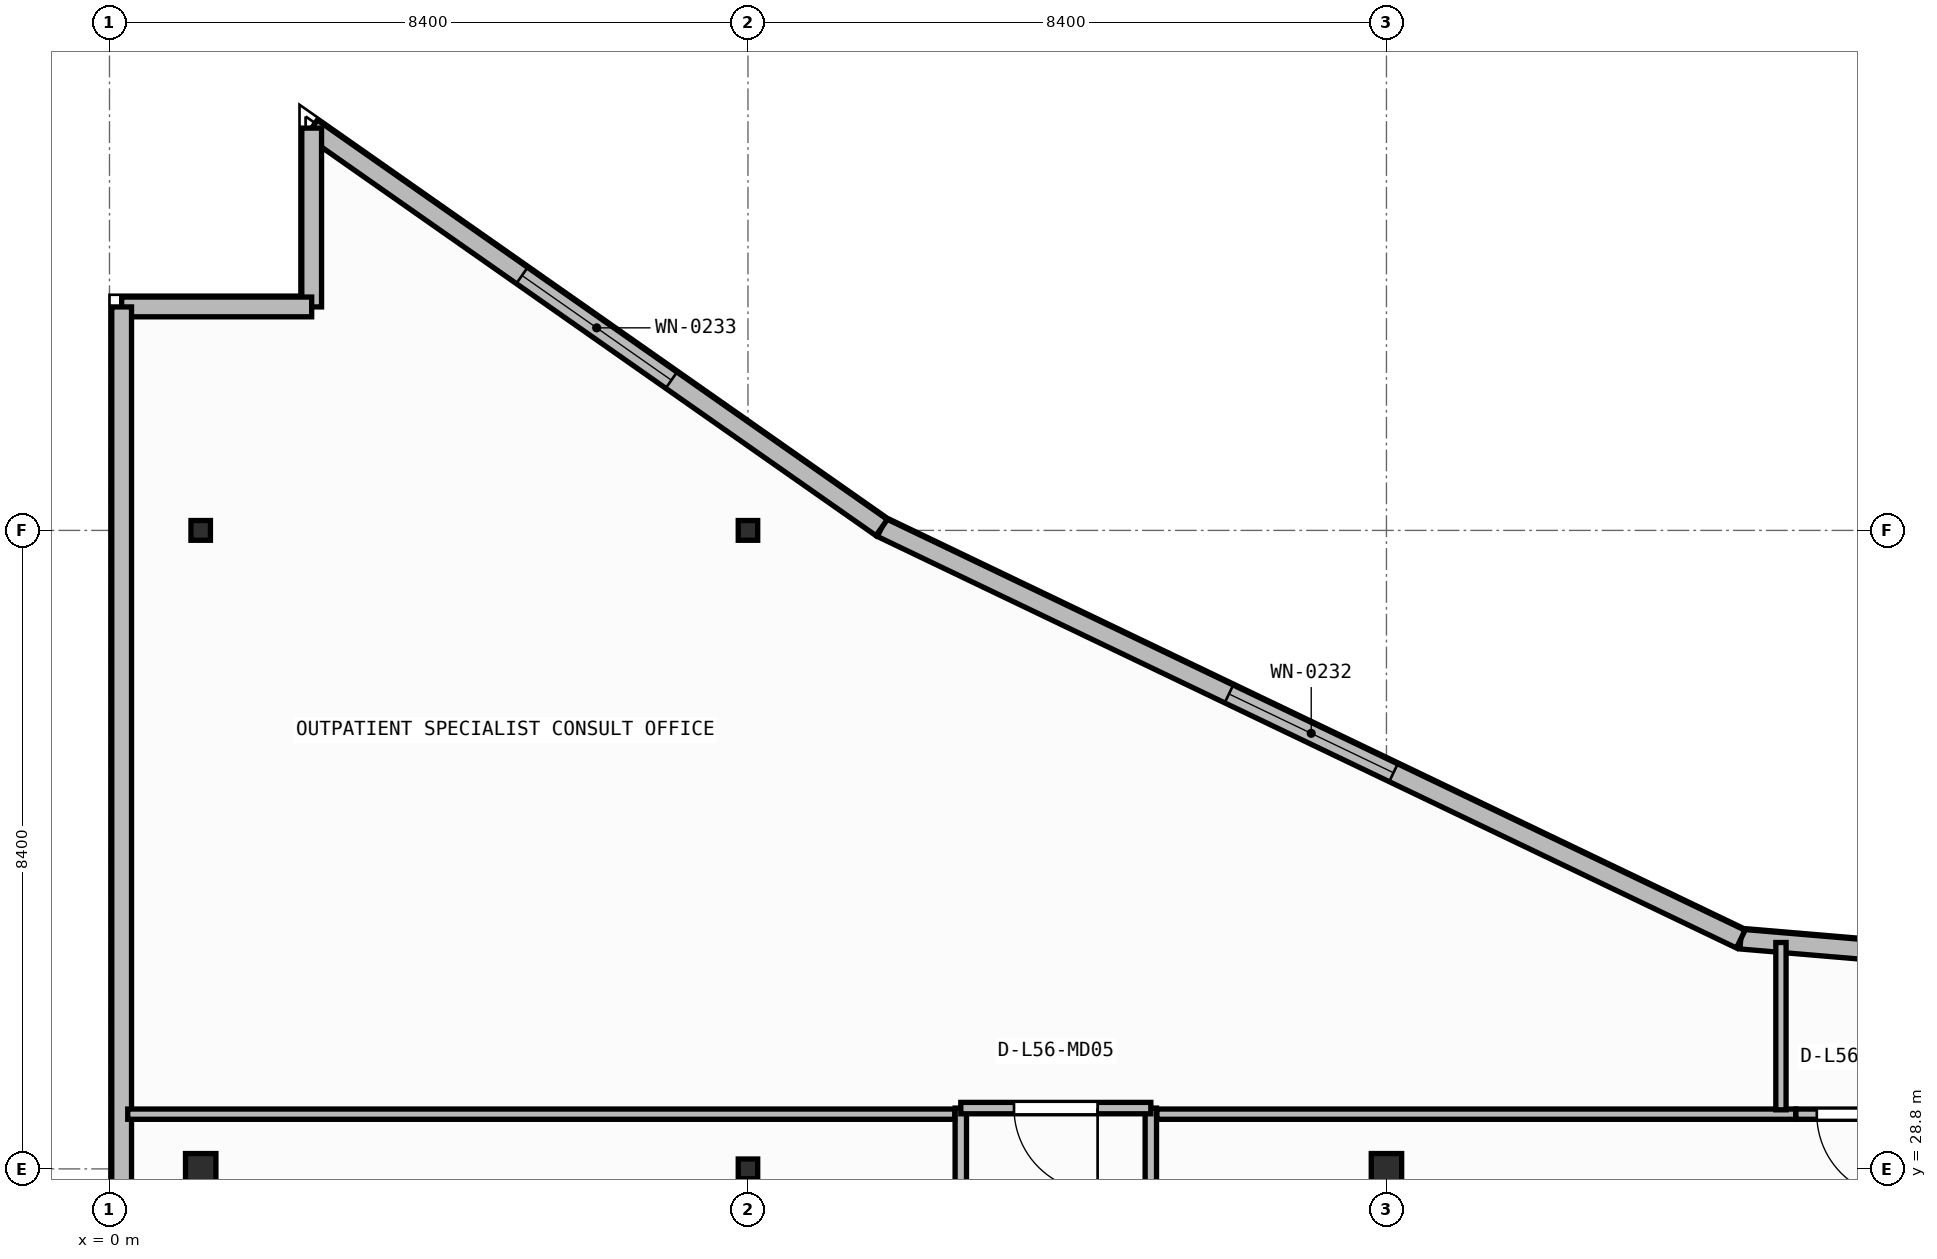
"""IFC4 building model, lengths in metres.
Left out: names, types, materials, properties, quantities, classifications, styles, units other than length and angle.
Written with IfcOpenShell. Run it as: python <this file> out.ifc"""

import sys

from ifc_helpers import new_model, si_unit, direction, frame, frame_2d, origin, origin_2d, place, context, subcontext, project, spatial, rectangle, i_section, extrude, element, fill, save


model = new_model("IFC4")
c1 = context("Model", 3, precision=1e-05, world=origin(), true_north=direction((0.0, 1.0)))
c2 = subcontext(c1, "Body", "Model", "MODEL_VIEW")
j1 = project(units=[si_unit("LENGTHUNIT", "METRE"), si_unit("PLANEANGLEUNIT", "RADIAN")], contexts=[c1])
p1 = place(None, origin())
s1 = spatial("IfcSite", under=j1, at=p1, CompositionType="ELEMENT")
p2 = place(p1, origin())
s2 = spatial("IfcBuilding", under=s1, at=p2, CompositionType="ELEMENT")
p3 = place(p2, frame((0.0, 0.0, 227.65)))
s3 = spatial("IfcBuildingStorey", under=s2, at=p3, CompositionType="ELEMENT", Elevation=227.65)
p4 = place(p3, frame((1.2, 28.8, 0.0), z_axis=(0.0, 0.0, 1.0), x_axis=(1.0, 0.0, 0.0)))
e1 = element("IfcColumn", 1, at=p4, inside=s3, PredefinedType="COLUMN", context=c2, shape_type="SweptSolid", body=[
    extrude(i_section(OverallWidth=0.4, OverallDepth=0.404, WebThickness=0.02, FlangeThickness=0.032, at=origin_2d()), origin(), (0.0, 0.0, 1.0), 3.95),
])
p5 = place(p3, frame((8.4, 28.8, 0.0), z_axis=(0.0, 0.0, 1.0), x_axis=(1.0, 0.0, 0.0)))
e2 = element("IfcColumn", 2, at=p5, inside=s3, PredefinedType="COLUMN", context=c2, shape_type="SweptSolid", body=[
    extrude(i_section(OverallWidth=0.256, OverallDepth=0.26, WebThickness=0.01, FlangeThickness=0.017, FilletRadius=0.013, at=origin_2d()), origin(), (0.0, 0.0, 1.0), 3.95),
])
p6 = place(p3, frame((16.8, 28.8, 0.0), z_axis=(0.0, 0.0, 1.0), x_axis=(1.0, 0.0, 0.0)))
e3 = element("IfcColumn", 3, at=p6, inside=s3, PredefinedType="COLUMN", context=c2, shape_type="SweptSolid", body=[
    extrude(i_section(OverallWidth=0.4, OverallDepth=0.404, WebThickness=0.02, FlangeThickness=0.032, at=origin_2d()), origin(), (0.0, 0.0, 1.0), 3.95),
])
for number, where, z_axis, x_axis in (
    (4, (1.2, 37.2, 0.0), (0.0, 0.0, 1.0), (1.0, 0.0, 0.0)),
    (5, (8.4, 37.2, 0.0), (0.0, 0.0, 1.0), (1.0, 0.0, 0.0)),
):
    element("IfcColumn", number, at=place(p3, frame(where, z_axis=z_axis, x_axis=x_axis)), inside=s3, PredefinedType="COLUMN", context=c2, shape_type="SweptSolid", body=[
        extrude(i_section(OverallWidth=0.256, OverallDepth=0.26, WebThickness=0.01, FlangeThickness=0.017, FilletRadius=0.013, at=origin_2d()), origin(), (0.0, 0.0, 1.0), 3.95),
    ])
p7 = place(p3, frame((34.815, 30.696, 0.0), z_axis=(0.0, 0.0, 1.0), x_axis=(-0.996454704935, 0.084130975344, 0.0)))
e6 = element("IfcWall", 6, at=p7, inside=s3, PredefinedType="STANDARD", context=c2, shape_type="SweptSolid", body=[
    extrude(rectangle(XDim=13.401, YDim=0.26, at=frame_2d((6.701, 0.0))), origin(), (0.0, 0.0, 1.0), 3.71),
])
p8 = place(p7, frame((5.5, 0.0, 0.9)))
e7 = element("IfcOpeningElement", 7, at=p8, cuts=e6, PredefinedType="OPENING", context=c2, shape_type="SweptSolid", body=[
    extrude(rectangle(XDim=2.4, YDim=1.65, at=frame_2d((1.2, 0.825))), frame((0.0, 0.14, 0.0), z_axis=(0.0, -1.0, 0.0), x_axis=(1.0, 0.0, 0.0)), (0.0, 0.0, 1.0), 0.28),
])
p9 = place(p3, frame((21.461, 31.823, 0.0), z_axis=(0.0, 0.0, 1.0), x_axis=(-0.901858094827, 0.432032379336, 0.0)))
e8 = element("IfcWall", 8, at=p9, inside=s3, PredefinedType="STANDARD", context=c2, shape_type="SweptSolid", body=[
    extrude(rectangle(XDim=12.532, YDim=0.26, at=frame_2d((6.266, 0.0))), origin(), (0.0, 0.0, 1.0), 3.71),
])
p10 = place(p9, frame((5.066, 0.0, 0.9)))
e9 = element("IfcOpeningElement", 9, at=p10, cuts=e8, PredefinedType="OPENING", context=c2, shape_type="SweptSolid", body=[
    extrude(rectangle(XDim=2.4, YDim=1.65, at=frame_2d((1.2, 0.825))), frame((0.0, 0.14, 0.0), z_axis=(0.0, -1.0, 0.0), x_axis=(1.0, 0.0, 0.0)), (0.0, 0.0, 1.0), 0.28),
])
p11 = place(p3, frame((10.159, 37.237, 0.0), z_axis=(0.0, 0.0, 1.0), x_axis=(-0.818933702389, 0.57388813465, 0.0)))
e10 = element("IfcWall", 10, at=p11, inside=s3, PredefinedType="STANDARD", context=c2, shape_type="SweptSolid", body=[
    extrude(rectangle(XDim=9.157, YDim=0.26, at=frame_2d((4.579, 0.0))), origin(), (0.0, 0.0, 1.0), 3.71),
])
p12 = place(p11, frame((3.378, 0.0, 0.9)))
e11 = element("IfcOpeningElement", 11, at=p12, cuts=e10, PredefinedType="OPENING", context=c2, shape_type="SweptSolid", body=[
    extrude(rectangle(XDim=2.4, YDim=1.65, at=frame_2d((1.2, 0.825))), frame((0.0, 0.14, 0.0), z_axis=(0.0, -1.0, 0.0), x_axis=(1.0, 0.0, 0.0)), (0.0, 0.0, 1.0), 0.28),
])
p13 = place(p3, frame((2.66, 42.492, 0.0), z_axis=(0.0, 0.0, 1.0), x_axis=(0.0, -1.0, 0.0)))
e12 = element("IfcWall", 12, at=p13, inside=s3, PredefinedType="STANDARD", context=c2, shape_type="SweptSolid", body=[
    extrude(rectangle(XDim=2.353, YDim=0.26, at=frame_2d((1.176, 0.0))), origin(), (0.0, 0.0, 1.0), 3.71),
])
p14 = place(p3, frame((2.66, 40.14, 0.0), z_axis=(0.0, 0.0, 1.0), x_axis=(-1.0, 0.0, 0.0)))
e13 = element("IfcWall", 13, at=p14, inside=s3, PredefinedType="STANDARD", context=c2, shape_type="SweptSolid", body=[
    extrude(rectangle(XDim=2.5, YDim=0.26, at=frame_2d((1.25, 0.0))), origin(), (0.0, 0.0, 1.0), 3.71),
])
p15 = place(p3, frame((0.16, 40.14, 0.0), z_axis=(0.0, 0.0, 1.0), x_axis=(0.0, -1.0, 0.0)))
e14 = element("IfcWall", 14, at=p15, inside=s3, PredefinedType="STANDARD", context=c2, shape_type="SweptSolid", body=[
    extrude(rectangle(XDim=37.48, YDim=0.26, at=frame_2d((18.74, 0.0))), origin(), (0.0, 0.0, 1.0), 3.71),
])
p16 = place(p15, frame((13.926, 0.0, 0.0)))
e15 = element("IfcOpeningElement", 15, at=p16, cuts=e14, PredefinedType="OPENING", context=c2, shape_type="SweptSolid", body=[
    extrude(rectangle(XDim=1.3, YDim=2.15, at=frame_2d((0.65, 1.075))), frame((0.0, 0.14, 0.0), z_axis=(0.0, -1.0, 0.0), x_axis=(1.0, 0.0, 0.0)), (0.0, 0.0, 1.0), 0.28),
])
p17 = place(p3, frame((11.2, 29.6, 0.0), z_axis=(0.0, 0.0, 1.0), x_axis=(0.0, -1.0, 0.0)))
e16 = element("IfcWall", 16, at=p17, inside=s3, PredefinedType="PARTITIONING", context=c2, shape_type="SweptSolid", body=[
    extrude(rectangle(XDim=7.232, YDim=0.15, at=frame_2d((3.616, 0.0))), origin(), (0.0, 0.0, 1.0), 3.71),
])
p18 = place(p17, frame((3.066, 0.0, 0.0)))
e17 = element("IfcOpeningElement", 17, at=p18, cuts=e16, PredefinedType="OPENING", context=c2, shape_type="SweptSolid", body=[
    extrude(rectangle(XDim=1.1, YDim=2.1, at=frame_2d((0.55, 1.05))), frame((0.0, 0.085, 0.0), z_axis=(0.0, -1.0, 0.0), x_axis=(1.0, 0.0, 0.0)), (0.0, 0.0, 1.0), 0.17),
])
p19 = place(p3, frame((13.7, 19.968, 0.0), z_axis=(0.0, 0.0, 1.0), x_axis=(0.0, 1.0, 0.0)))
e18 = element("IfcWall", 18, at=p19, inside=s3, PredefinedType="PARTITIONING", context=c2, shape_type="SweptSolid", body=[
    extrude(rectangle(XDim=9.632, YDim=0.15, at=frame_2d((4.816, 0.0))), origin(), (0.0, 0.0, 1.0), 3.71),
])
p20 = place(p19, frame((4.266, 0.0, 0.0)))
e19 = element("IfcOpeningElement", 19, at=p20, cuts=e18, PredefinedType="OPENING", context=c2, shape_type="SweptSolid", body=[
    extrude(rectangle(XDim=1.1, YDim=2.1, at=frame_2d((0.55, 1.05))), frame((0.0, 0.085, 0.0), z_axis=(0.0, -1.0, 0.0), x_axis=(1.0, 0.0, 0.0)), (0.0, 0.0, 1.0), 0.17),
])
p21 = place(p3, frame((13.7, 29.6, 0.0), z_axis=(0.0, 0.0, 1.0), x_axis=(-1.0, 0.0, 0.0)))
e20 = element("IfcWall", 20, at=p21, inside=s3, PredefinedType="PARTITIONING", context=c2, shape_type="SweptSolid", body=[
    extrude(rectangle(XDim=2.5, YDim=0.15, at=frame_2d((1.25, 0.0))), origin(), (0.0, 0.0, 1.0), 3.71),
])
p22 = place(p21, frame((0.7, 0.0, 0.0)))
e21 = element("IfcOpeningElement", 21, at=p22, cuts=e20, PredefinedType="OPENING", context=c2, shape_type="SweptSolid", body=[
    extrude(rectangle(XDim=1.1, YDim=2.1, at=frame_2d((0.55, 1.05))), frame((0.0, 0.085, 0.0), z_axis=(0.0, -1.0, 0.0), x_axis=(1.0, 0.0, 0.0)), (0.0, 0.0, 1.0), 0.17),
])
p23 = place(p3, frame((11.12, 29.52, 0.0), z_axis=(0.0, 0.0, 1.0), x_axis=(-1.0, 0.0, 0.0)))
e22 = element("IfcWall", 22, at=p23, inside=s3, PredefinedType="PARTITIONING", context=c2, shape_type="SweptSolid", body=[
    extrude(rectangle(XDim=10.88, YDim=0.135, at=frame_2d((5.44, 0.0))), origin(), (0.0, 0.0, 1.0), 3.71),
])
p24 = place(p3, frame((22.185, 29.52, 0.0), z_axis=(0.0, 0.0, 1.0), x_axis=(-1.0, 0.0, 0.0)))
e23 = element("IfcWall", 23, at=p24, inside=s3, PredefinedType="PARTITIONING", context=c2, shape_type="SweptSolid", body=[
    extrude(rectangle(XDim=8.405, YDim=0.135, at=frame_2d((4.202, 0.0))), origin(), (0.0, 0.0, 1.0), 3.71),
])
p25 = place(p3, frame((26.7, 29.52, 0.0), z_axis=(0.0, 0.0, 1.0), x_axis=(-1.0, 0.0, 0.0)))
e24 = element("IfcWall", 24, at=p25, inside=s3, PredefinedType="PARTITIONING", context=c2, shape_type="SweptSolid", body=[
    extrude(rectangle(XDim=4.513, YDim=0.135, at=frame_2d((2.257, 0.0))), origin(), (0.0, 0.0, 1.0), 3.71),
])
p26 = place(p25, frame((3.138, 0.0, 0.0)))
e25 = element("IfcOpeningElement", 25, at=p26, cuts=e24, PredefinedType="OPENING", context=c2, shape_type="SweptSolid", body=[
    extrude(rectangle(XDim=1.1, YDim=2.1, at=frame_2d((0.55, 1.05))), frame((0.0, 0.077, 0.0), z_axis=(0.0, -1.0, 0.0), x_axis=(1.0, 0.0, 0.0)), (0.0, 0.0, 1.0), 0.155),
])
p27 = place(p3, frame((21.99, 29.577, 0.0), z_axis=(0.0, 0.0, 1.0), x_axis=(0.0, 1.0, 0.0)))
e26 = element("IfcWall", 26, at=p27, inside=s3, PredefinedType="PARTITIONING", context=c2, shape_type="SweptSolid", body=[
    extrude(rectangle(XDim=2.201, YDim=0.135, at=frame_2d((1.101, 0.0))), origin(), (0.0, 0.0, 1.0), 3.71),
])
p28 = place(p10, origin())
e27 = element("IfcWindow", 27, at=p28, inside=s3, PartitioningType="SINGLE_PANEL", PredefinedType="WINDOW", context=c2, shape_type="SweptSolid", body=[
    extrude(rectangle(XDim=2.4, YDim=1.65, at=frame_2d((1.2, 0.825))), frame((0.0, 0.03, 0.0), z_axis=(0.0, -1.0, 0.0), x_axis=(1.0, 0.0, 0.0)), (0.0, 0.0, 1.0), 0.06),
])
fill(e9, e27)
p29 = place(p12, origin())
e28 = element("IfcWindow", 28, at=p29, inside=s3, PartitioningType="SINGLE_PANEL", PredefinedType="WINDOW", context=c2, shape_type="SweptSolid", body=[
    extrude(rectangle(XDim=2.4, YDim=1.65, at=frame_2d((1.2, 0.825))), frame((0.0, 0.03, 0.0), z_axis=(0.0, -1.0, 0.0), x_axis=(1.0, 0.0, 0.0)), (0.0, 0.0, 1.0), 0.06),
])
fill(e11, e28)
p30 = place(p22, origin())
e29 = element("IfcDoor", 29, at=p30, inside=s3, OperationType="SINGLE_SWING_LEFT", PredefinedType="DOOR", context=c2, shape_type="SweptSolid", body=[
    extrude(rectangle(XDim=1.1, YDim=2.1, at=frame_2d((0.55, 1.05))), frame((0.0, 0.025, 0.0), z_axis=(0.0, -1.0, 0.0), x_axis=(1.0, 0.0, 0.0)), (0.0, 0.0, 1.0), 0.05),
])
fill(e21, e29)
p31 = place(p26, origin())
e30 = element("IfcDoor", 30, at=p31, inside=s3, OperationType="SINGLE_SWING_LEFT", PredefinedType="DOOR", context=c2, shape_type="SweptSolid", body=[
    extrude(rectangle(XDim=1.1, YDim=2.1, at=frame_2d((0.55, 1.05))), frame((0.0, 0.025, 0.0), z_axis=(0.0, -1.0, 0.0), x_axis=(1.0, 0.0, 0.0)), (0.0, 0.0, 1.0), 0.05),
])
fill(e25, e30)
save(model, sys.argv[1])
